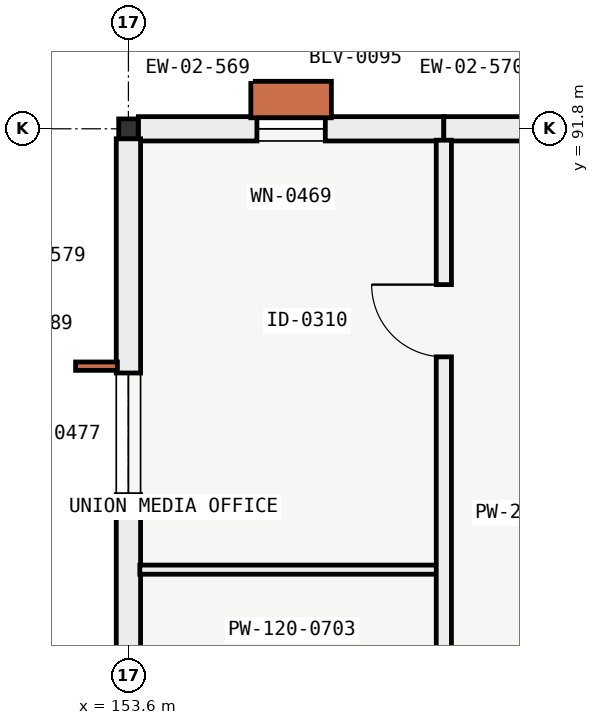
"""IFC4 building model, lengths in metres.
Left out: names, types, materials, properties, quantities, classifications, styles, units other than length and angle.
Written with IfcOpenShell. Run it as: python <this file> out.ifc"""

import sys

from ifc_helpers import new_model, si_unit, direction, frame, frame_2d, origin, origin_2d, place, context, subcontext, project, spatial, rectangle, i_section, extrude, element, fill, save


model = new_model("IFC4")
c1 = context("Model", 3, precision=1e-05, world=origin(), true_north=direction((0.0, 1.0)))
c2 = subcontext(c1, "Body", "Model", "MODEL_VIEW")
j1 = project(units=[si_unit("LENGTHUNIT", "METRE"), si_unit("PLANEANGLEUNIT", "RADIAN")], contexts=[c1])
p1 = place(None, origin())
s1 = spatial("IfcSite", under=j1, at=p1, CompositionType="ELEMENT")
p2 = place(p1, origin())
s2 = spatial("IfcBuilding", under=s1, at=p2, CompositionType="ELEMENT")
p3 = place(p2, frame((0.0, 0.0, 5.4)))
s3 = spatial("IfcBuildingStorey", under=s2, at=p3, CompositionType="ELEMENT", Elevation=5.4)
p4 = place(p3, frame((153.6, 91.8, 0.0), z_axis=(0.0, 0.0, 1.0), x_axis=(1.0, 0.0, 0.0)))
e1 = element("IfcColumn", 1, at=p4, inside=s3, PredefinedType="COLUMN", context=c2, shape_type="SweptSolid", body=[
    extrude(i_section(OverallWidth=0.256, OverallDepth=0.26, WebThickness=0.01, FlangeThickness=0.017, FilletRadius=0.014, at=origin_2d()), origin(), (0.0, 0.0, 1.0), 4.2),
])
p5 = place(p3, frame((153.731, 91.8, 0.0), z_axis=(0.0, 0.0, 1.0), x_axis=(1.0, 0.0, 0.0)))
e2 = element("IfcWall", 2, at=p5, inside=s3, PredefinedType="SOLIDWALL", context=c2, shape_type="SweptSolid", body=[
    extrude(rectangle(XDim=4.019, YDim=0.32, at=frame_2d((2.01, 0.0))), origin(), (0.0, 0.0, 1.0), 3.44),
])
p6 = place(p5, frame((1.56, 0.0, 0.85)))
e3 = element("IfcOpeningElement", 3, at=p6, cuts=e2, PredefinedType="OPENING", context=c2, shape_type="SweptSolid", body=[
    extrude(rectangle(XDim=0.9, YDim=2.2, at=frame_2d((0.45, 1.1))), frame((0.0, 0.17, 0.0), z_axis=(0.0, -1.0, 0.0), x_axis=(1.0, 0.0, 0.0)), (0.0, 0.0, 1.0), 0.34),
])
p7 = place(p3, frame((157.75, 91.8, 0.0), z_axis=(0.0, 0.0, 1.0), x_axis=(1.0, 0.0, 0.0)))
e4 = element("IfcWall", 4, at=p7, inside=s3, PredefinedType="SOLIDWALL", context=c2, shape_type="SweptSolid", body=[
    extrude(rectangle(XDim=3.2, YDim=0.32, at=frame_2d((1.6, 0.0))), origin(), (0.0, 0.0, 1.0), 3.44),
])
p8 = place(p7, frame((1.15, 0.0, 0.85)))
e5 = element("IfcOpeningElement", 5, at=p8, cuts=e4, PredefinedType="OPENING", context=c2, shape_type="SweptSolid", body=[
    extrude(rectangle(XDim=0.9, YDim=2.2, at=frame_2d((0.45, 1.1))), frame((0.0, 0.17, 0.0), z_axis=(0.0, -1.0, 0.0), x_axis=(1.0, 0.0, 0.0)), (0.0, 0.0, 1.0), 0.34),
])
p9 = place(p3, frame((153.6, 83.906, 0.0), z_axis=(0.0, 0.0, 1.0), x_axis=(0.0, 1.0, 0.0)))
e6 = element("IfcWall", 6, at=p9, inside=s3, PredefinedType="SOLIDWALL", context=c2, shape_type="SweptSolid", body=[
    extrude(rectangle(XDim=7.763, YDim=0.32, at=frame_2d((3.882, 0.0))), origin(), (0.0, 0.0, 1.0), 3.494),
])
p10 = place(p9, frame((3.082, 0.0, 0.9)))
e7 = element("IfcOpeningElement", 7, at=p10, cuts=e6, PredefinedType="OPENING", context=c2, shape_type="SweptSolid", body=[
    extrude(rectangle(XDim=1.6, YDim=1.9, at=frame_2d((0.8, 0.95))), frame((0.0, 0.17, 0.0), z_axis=(0.0, -1.0, 0.0), x_axis=(1.0, 0.0, 0.0)), (0.0, 0.0, 1.0), 0.34),
])
p11 = place(p3, frame((153.75, 86.0, 0.0), z_axis=(0.0, 0.0, 1.0), x_axis=(1.0, 0.0, 0.0)))
e8 = element("IfcWall", 8, at=p11, inside=s3, PredefinedType="PARTITIONING", context=c2, shape_type="SweptSolid", body=[
    extrude(rectangle(XDim=4.0, YDim=0.12, at=frame_2d((2.0, 0.0))), origin(), (0.0, 0.0, 1.0), 3.85),
])
p12 = place(p3, frame((157.75, 81.6, 0.0), z_axis=(0.0, 0.0, 1.0), x_axis=(0.0, 1.0, 0.0)))
e9 = element("IfcWall", 9, at=p12, inside=s3, PredefinedType="PARTITIONING", context=c2, shape_type="SweptSolid", body=[
    extrude(rectangle(XDim=10.05, YDim=0.2, at=frame_2d((5.025, 0.0))), origin(), (0.0, 0.0, 1.0), 3.44),
])
p13 = place(p12, frame((2.2, 0.0, 0.0)))
e10 = element("IfcOpeningElement", 10, at=p13, cuts=e9, PredefinedType="OPENING", context=c2, shape_type="SweptSolid", body=[
    extrude(rectangle(XDim=0.9, YDim=2.05, at=frame_2d((0.45, 1.025))), frame((0.0, 0.11, 0.0), z_axis=(0.0, -1.0, 0.0), x_axis=(1.0, 0.0, 0.0)), (0.0, 0.0, 1.0), 0.22),
])
p14 = place(p12, frame((7.2, 0.0, 0.0)))
e11 = element("IfcOpeningElement", 11, at=p14, cuts=e9, PredefinedType="OPENING", context=c2, shape_type="SweptSolid", body=[
    extrude(rectangle(XDim=0.95, YDim=2.1, at=frame_2d((0.475, 1.05))), frame((0.0, 0.11, 0.0), z_axis=(0.0, -1.0, 0.0), x_axis=(1.0, 0.0, 0.0)), (0.0, 0.0, 1.0), 0.22),
])
p15 = place(p6, origin())
e12 = element("IfcWindow", 12, at=p15, inside=s3, PartitioningType="SINGLE_PANEL", PredefinedType="WINDOW", context=c2, shape_type="SweptSolid", body=[
    extrude(rectangle(XDim=0.9, YDim=2.2, at=frame_2d((0.45, 1.1))), frame((0.0, 0.03, 0.0), z_axis=(0.0, -1.0, 0.0), x_axis=(1.0, 0.0, 0.0)), (0.0, 0.0, 1.0), 0.06),
])
fill(e3, e12)
p16 = place(p10, origin())
e13 = element("IfcWindow", 13, at=p16, inside=s3, PartitioningType="SINGLE_PANEL", PredefinedType="WINDOW", context=c2, shape_type="SweptSolid", body=[
    extrude(rectangle(XDim=1.6, YDim=1.9, at=frame_2d((0.8, 0.95))), frame((0.0, 0.03, 0.0), z_axis=(0.0, -1.0, 0.0), x_axis=(1.0, 0.0, 0.0)), (0.0, 0.0, 1.0), 0.06),
])
fill(e7, e13)
p17 = place(p14, origin())
e14 = element("IfcDoor", 14, at=p17, inside=s3, OperationType="SINGLE_SWING_RIGHT", PredefinedType="DOOR", context=c2, shape_type="SweptSolid", body=[
    extrude(rectangle(XDim=0.95, YDim=2.1, at=frame_2d((0.475, 1.05))), frame((0.0, 0.025, 0.0), z_axis=(0.0, -1.0, 0.0), x_axis=(1.0, 0.0, 0.0)), (0.0, 0.0, 1.0), 0.05),
])
fill(e11, e14)
save(model, sys.argv[1])
